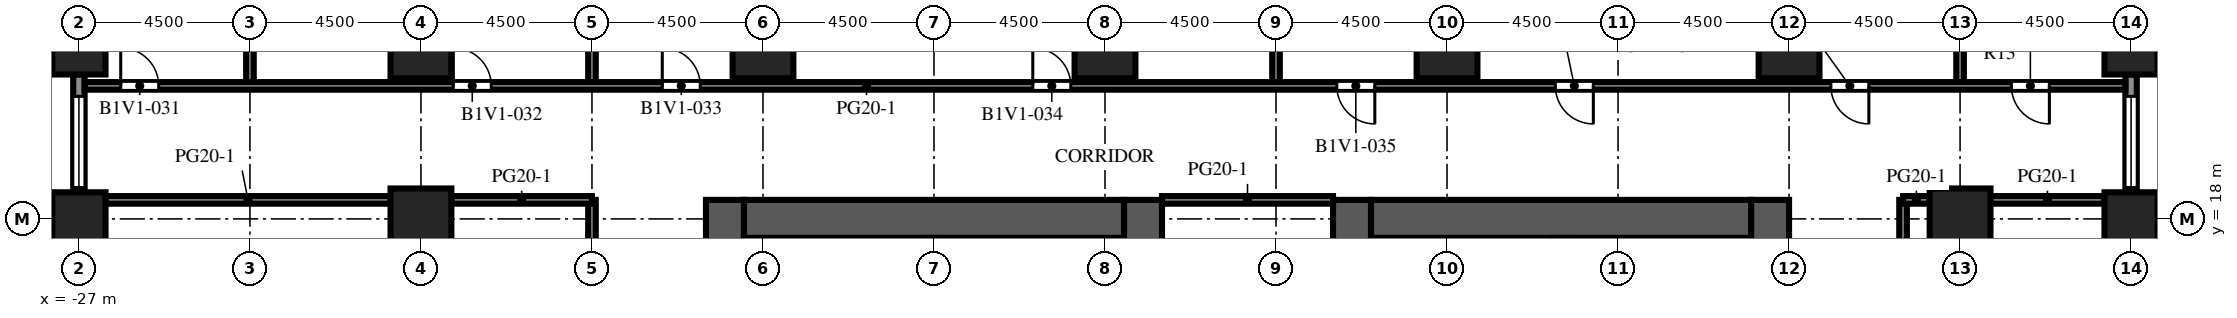
"""IFC4 building model, lengths in metres.
Left out: names, types, materials, properties, quantities, classifications, styles, units other than length and angle.
Written with IfcOpenShell. Run it as: python <this file> out.ifc"""

import sys

from ifc_helpers import new_model, si_unit, direction, frame, frame_2d, origin, origin_2d, place, context, subcontext, project, spatial, rectangle, extrude, element, fill, save


model = new_model("IFC4")
c1 = context("Model", 3, precision=1e-05, world=origin(), true_north=direction((0.0, 1.0)))
c2 = subcontext(c1, "Body", "Model", "MODEL_VIEW")
j1 = project(units=[si_unit("LENGTHUNIT", "METRE"), si_unit("PLANEANGLEUNIT", "RADIAN")], contexts=[c1])
p1 = place(None, origin())
s1 = spatial("IfcSite", under=j1, at=p1, CompositionType="ELEMENT")
p2 = place(p1, origin())
s2 = spatial("IfcBuilding", under=s1, at=p2, CompositionType="ELEMENT")
p3 = place(p2, frame((0.0, 0.0, 27.7)))
s3 = spatial("IfcBuildingStorey", under=s2, at=p3, CompositionType="ELEMENT", Elevation=27.7)
for number, where, z_axis, x_axis in (
    (1, (-27.0, 18.0, 0.0), (0.0, 0.0, 1.0), (1.0, 0.0, 0.0)),
    (2, (-27.0, 22.5, 0.0), (0.0, 0.0, 1.0), (1.0, 0.0, 0.0)),
    (3, (27.0, 18.0, 0.0), (0.0, 0.0, 1.0), (1.0, 0.0, 0.0)),
    (4, (27.0, 22.5, 0.0), (0.0, 0.0, 1.0), (1.0, 0.0, 0.0)),
):
    element("IfcColumn", number, at=place(p3, frame(where, z_axis=z_axis, x_axis=x_axis)), inside=s3, PredefinedType="COLUMN", context=c2, shape_type="SweptSolid", body=[
        extrude(rectangle(XDim=1.4, YDim=1.4, at=origin_2d()), origin(), (0.0, 0.0, 1.0), 4.1),
    ])
for number, where, z_axis, x_axis in (
    (5, (-18.0, 18.0, 0.0), (0.0, 0.0, 1.0), (1.0, 0.0, 0.0)),
    (6, (-18.0, 22.5, 0.0), (0.0, 0.0, 1.0), (1.0, 0.0, 0.0)),
    (7, (-9.0, 22.5, 0.0), (0.0, 0.0, 1.0), (1.0, 0.0, 0.0)),
    (8, (0.0, 22.5, 0.0), (0.0, 0.0, 1.0), (1.0, 0.0, 0.0)),
    (9, (9.0, 22.5, 0.0), (0.0, 0.0, 1.0), (1.0, 0.0, 0.0)),
    (10, (18.0, 22.5, 0.0), (0.0, 0.0, 1.0), (1.0, 0.0, 0.0)),
    (11, (22.5, 18.0, 0.0), (0.0, 0.0, 1.0), (1.0, 0.0, 0.0)),
):
    element("IfcColumn", number, at=place(p3, frame(where, z_axis=z_axis, x_axis=x_axis)), inside=s3, PredefinedType="COLUMN", context=c2, shape_type="SweptSolid", body=[
        extrude(rectangle(XDim=1.6, YDim=1.6, at=origin_2d()), origin(), (0.0, 0.0, 1.0), 4.1),
    ])
p4 = place(p3, frame((-10.0, -9.0, 0.0), z_axis=(0.0, 0.0, 1.0), x_axis=(0.0, 1.0, 0.0)))
e12 = element("IfcWall", 12, at=p4, inside=s3, PredefinedType="SHEAR", context=c2, shape_type="SweptSolid", body=[
    extrude(rectangle(XDim=27.5, YDim=1.0, at=frame_2d((13.75, 0.0))), origin(), (0.0, 0.0, 1.0), 4.1),
])
p5 = place(p4, frame((12.55, 0.0, 0.0)))
e13 = element("IfcOpeningElement", 13, at=p5, cuts=e12, PredefinedType="OPENING", context=c2, shape_type="SweptSolid", body=[
    extrude(rectangle(XDim=2.4, YDim=2.4, at=frame_2d((1.2, 1.2))), frame((0.0, 0.51, 0.0), z_axis=(0.0, -1.0, 0.0), x_axis=(1.0, 0.0, 0.0)), (0.0, 0.0, 1.0), 1.02),
])
p6 = place(p4, frame((6.825, 0.0, 0.0)))
e14 = element("IfcOpeningElement", 14, at=p6, cuts=e12, PredefinedType="OPENING", context=c2, shape_type="SweptSolid", body=[
    extrude(rectangle(XDim=1.2, YDim=2.1, at=frame_2d((0.6, 1.05))), frame((0.0, 0.51, 0.0), z_axis=(0.0, -1.0, 0.0), x_axis=(1.0, 0.0, 0.0)), (0.0, 0.0, 1.0), 1.02),
])
p7 = place(p4, frame((19.475, 0.0, 0.0)))
e15 = element("IfcOpeningElement", 15, at=p7, cuts=e12, PredefinedType="OPENING", context=c2, shape_type="SweptSolid", body=[
    extrude(rectangle(XDim=1.2, YDim=2.1, at=frame_2d((0.6, 1.05))), frame((0.0, 0.51, 0.0), z_axis=(0.0, -1.0, 0.0), x_axis=(1.0, 0.0, 0.0)), (0.0, 0.0, 1.0), 1.02),
])
p8 = place(p3, frame((1.0, -9.0, 0.0), z_axis=(0.0, 0.0, 1.0), x_axis=(0.0, 1.0, 0.0)))
e16 = element("IfcWall", 16, at=p8, inside=s3, PredefinedType="SHEAR", context=c2, shape_type="SweptSolid", body=[
    extrude(rectangle(XDim=27.5, YDim=1.0, at=frame_2d((13.75, 0.0))), origin(), (0.0, 0.0, 1.0), 4.1),
])
p9 = place(p8, frame((12.55, 0.0, 0.0)))
e17 = element("IfcOpeningElement", 17, at=p9, cuts=e16, PredefinedType="OPENING", context=c2, shape_type="SweptSolid", body=[
    extrude(rectangle(XDim=2.4, YDim=2.4, at=frame_2d((1.2, 1.2))), frame((0.0, 0.51, 0.0), z_axis=(0.0, -1.0, 0.0), x_axis=(1.0, 0.0, 0.0)), (0.0, 0.0, 1.0), 1.02),
])
p10 = place(p8, frame((3.955, 0.0, 0.0)))
e18 = element("IfcOpeningElement", 18, at=p10, cuts=e16, PredefinedType="OPENING", context=c2, shape_type="SweptSolid", body=[
    extrude(rectangle(XDim=0.905, YDim=2.1, at=frame_2d((0.453, 1.05))), frame((0.0, 0.51, 0.0), z_axis=(0.0, -1.0, 0.0), x_axis=(1.0, 0.0, 0.0)), (0.0, 0.0, 1.0), 1.02),
])
p11 = place(p8, frame((23.363, 0.0, 0.0)))
e19 = element("IfcOpeningElement", 19, at=p11, cuts=e16, PredefinedType="OPENING", context=c2, shape_type="SweptSolid", body=[
    extrude(rectangle(XDim=1.2, YDim=2.1, at=frame_2d((0.6, 1.05))), frame((0.0, 0.51, 0.0), z_axis=(0.0, -1.0, 0.0), x_axis=(1.0, 0.0, 0.0)), (0.0, 0.0, 1.0), 1.02),
])
p12 = place(p3, frame((-9.5, 18.0, 0.0), z_axis=(0.0, 0.0, 1.0), x_axis=(1.0, 0.0, 0.0)))
e20 = element("IfcWall", 20, at=p12, inside=s3, PredefinedType="SHEAR", context=c2, shape_type="SweptSolid", body=[
    extrude(rectangle(XDim=10.0, YDim=1.0, at=frame_2d((5.0, 0.0))), origin(), (0.0, 0.0, 1.0), 4.1),
])
p13 = place(p3, frame((6.5, -9.0, 0.0), z_axis=(0.0, 0.0, 1.0), x_axis=(0.0, 1.0, 0.0)))
e21 = element("IfcWall", 21, at=p13, inside=s3, PredefinedType="SHEAR", context=c2, shape_type="SweptSolid", body=[
    extrude(rectangle(XDim=27.5, YDim=1.0, at=frame_2d((13.75, 0.0))), origin(), (0.0, 0.0, 1.0), 4.1),
])
p14 = place(p13, frame((12.55, 0.0, 0.0)))
e22 = element("IfcOpeningElement", 22, at=p14, cuts=e21, PredefinedType="OPENING", context=c2, shape_type="SweptSolid", body=[
    extrude(rectangle(XDim=2.4, YDim=2.4, at=frame_2d((1.2, 1.2))), frame((0.0, 0.51, 0.0), z_axis=(0.0, -1.0, 0.0), x_axis=(1.0, 0.0, 0.0)), (0.0, 0.0, 1.0), 1.02),
])
p15 = place(p13, frame((3.955, 0.0, 0.0)))
e23 = element("IfcOpeningElement", 23, at=p15, cuts=e21, PredefinedType="OPENING", context=c2, shape_type="SweptSolid", body=[
    extrude(rectangle(XDim=0.905, YDim=2.1, at=frame_2d((0.453, 1.05))), frame((0.0, 0.51, 0.0), z_axis=(0.0, -1.0, 0.0), x_axis=(1.0, 0.0, 0.0)), (0.0, 0.0, 1.0), 1.02),
])
p16 = place(p13, frame((23.363, 0.0, 0.0)))
e24 = element("IfcOpeningElement", 24, at=p16, cuts=e21, PredefinedType="OPENING", context=c2, shape_type="SweptSolid", body=[
    extrude(rectangle(XDim=1.2, YDim=2.1, at=frame_2d((0.6, 1.05))), frame((0.0, 0.51, 0.0), z_axis=(0.0, -1.0, 0.0), x_axis=(1.0, 0.0, 0.0)), (0.0, 0.0, 1.0), 1.02),
])
p17 = place(p3, frame((17.5, -9.0, 0.0), z_axis=(0.0, 0.0, 1.0), x_axis=(0.0, 1.0, 0.0)))
e25 = element("IfcWall", 25, at=p17, inside=s3, PredefinedType="SHEAR", context=c2, shape_type="SweptSolid", body=[
    extrude(rectangle(XDim=27.5, YDim=1.0, at=frame_2d((13.75, 0.0))), origin(), (0.0, 0.0, 1.0), 4.1),
])
p18 = place(p17, frame((12.55, 0.0, 0.0)))
e26 = element("IfcOpeningElement", 26, at=p18, cuts=e25, PredefinedType="OPENING", context=c2, shape_type="SweptSolid", body=[
    extrude(rectangle(XDim=2.4, YDim=2.4, at=frame_2d((1.2, 1.2))), frame((0.0, 0.51, 0.0), z_axis=(0.0, -1.0, 0.0), x_axis=(1.0, 0.0, 0.0)), (0.0, 0.0, 1.0), 1.02),
])
p19 = place(p17, frame((6.825, 0.0, 0.0)))
e27 = element("IfcOpeningElement", 27, at=p19, cuts=e25, PredefinedType="OPENING", context=c2, shape_type="SweptSolid", body=[
    extrude(rectangle(XDim=1.2, YDim=2.1, at=frame_2d((0.6, 1.05))), frame((0.0, 0.51, 0.0), z_axis=(0.0, -1.0, 0.0), x_axis=(1.0, 0.0, 0.0)), (0.0, 0.0, 1.0), 1.02),
])
p20 = place(p17, frame((19.475, 0.0, 0.0)))
e28 = element("IfcOpeningElement", 28, at=p20, cuts=e25, PredefinedType="OPENING", context=c2, shape_type="SweptSolid", body=[
    extrude(rectangle(XDim=1.2, YDim=2.1, at=frame_2d((0.6, 1.05))), frame((0.0, 0.51, 0.0), z_axis=(0.0, -1.0, 0.0), x_axis=(1.0, 0.0, 0.0)), (0.0, 0.0, 1.0), 1.02),
])
p21 = place(p3, frame((7.0, 18.0, 0.0), z_axis=(0.0, 0.0, 1.0), x_axis=(1.0, 0.0, 0.0)))
e29 = element("IfcWall", 29, at=p21, inside=s3, PredefinedType="SHEAR", context=c2, shape_type="SweptSolid", body=[
    extrude(rectangle(XDim=10.0, YDim=1.0, at=frame_2d((5.0, 0.0))), origin(), (0.0, 0.0, 1.0), 4.1),
])
p22 = place(p3, frame((27.0, 21.8, 0.0), z_axis=(0.0, 0.0, 1.0), x_axis=(0.0, -1.0, 0.0)))
e30 = element("IfcWall", 30, at=p22, inside=s3, PredefinedType="SOLIDWALL", context=c2, shape_type="SweptSolid", body=[
    extrude(rectangle(XDim=3.1, YDim=0.3, at=frame_2d((1.55, 0.0))), origin(), (0.0, 0.0, 1.0), 2.75),
])
p23 = place(p22, frame((0.575, 0.0, 0.8)))
e31 = element("IfcOpeningElement", 31, at=p23, cuts=e30, PredefinedType="OPENING", context=c2, shape_type="SweptSolid", body=[
    extrude(rectangle(XDim=2.4, YDim=1.7, at=frame_2d((1.2, 0.85))), frame((0.0, 0.16, 0.0), z_axis=(0.0, -1.0, 0.0), x_axis=(1.0, 0.0, 0.0)), (0.0, 0.0, 1.0), 0.32),
])
p24 = place(p3, frame((-27.0, 18.7, 0.0), z_axis=(0.0, 0.0, 1.0), x_axis=(0.0, 1.0, 0.0)))
e32 = element("IfcWall", 32, at=p24, inside=s3, PredefinedType="SOLIDWALL", context=c2, shape_type="SweptSolid", body=[
    extrude(rectangle(XDim=3.1, YDim=0.3, at=frame_2d((1.55, 0.0))), origin(), (0.0, 0.0, 1.0), 2.75),
])
p25 = place(p24, frame((0.125, 0.0, 0.8)))
e33 = element("IfcOpeningElement", 33, at=p25, cuts=e32, PredefinedType="OPENING", context=c2, shape_type="SweptSolid", body=[
    extrude(rectangle(XDim=2.4, YDim=1.7, at=frame_2d((1.2, 0.85))), frame((0.0, 0.16, 0.0), z_axis=(0.0, -1.0, 0.0), x_axis=(1.0, 0.0, 0.0)), (0.0, 0.0, 1.0), 0.32),
])
p26 = place(p3, frame((-22.5, 21.5, 0.0), z_axis=(0.0, 0.0, 1.0), x_axis=(0.0, 1.0, 0.0)))
e34 = element("IfcWall", 34, at=p26, inside=s3, PredefinedType="PARTITIONING", context=c2, shape_type="SweptSolid", body=[
    extrude(rectangle(XDim=4.8, YDim=0.2, at=frame_2d((2.4, 0.0))), origin(), (0.0, 0.0, 1.0), 3.65),
])
p27 = place(p3, frame((-13.5, -9.0, 0.0), z_axis=(0.0, 0.0, 1.0), x_axis=(0.0, 1.0, 0.0)))
e35 = element("IfcWall", 35, at=p27, inside=s3, PredefinedType="PARTITIONING", context=c2, shape_type="SweptSolid", body=[
    extrude(rectangle(XDim=27.5, YDim=0.2, at=frame_2d((13.75, 0.0))), origin(), (0.0, 0.0, 1.0), 3.65),
])
p28 = place(p27, frame((8.6, 0.0, 0.0)))
e36 = element("IfcOpeningElement", 36, at=p28, cuts=e35, PredefinedType="OPENING", context=c2, shape_type="SweptSolid", body=[
    extrude(rectangle(XDim=1.0, YDim=2.1, at=frame_2d((0.5, 1.05))), frame((0.0, 0.11, 0.0), z_axis=(0.0, -1.0, 0.0), x_axis=(1.0, 0.0, 0.0)), (0.0, 0.0, 1.0), 0.22),
])
p29 = place(p27, frame((15.1, 0.0, 0.0)))
e37 = element("IfcOpeningElement", 37, at=p29, cuts=e35, PredefinedType="OPENING", context=c2, shape_type="SweptSolid", body=[
    extrude(rectangle(XDim=1.0, YDim=2.1, at=frame_2d((0.5, 1.05))), frame((0.0, 0.11, 0.0), z_axis=(0.0, -1.0, 0.0), x_axis=(1.0, 0.0, 0.0)), (0.0, 0.0, 1.0), 0.22),
])
p30 = place(p27, frame((21.6, 0.0, 0.0)))
e38 = element("IfcOpeningElement", 38, at=p30, cuts=e35, PredefinedType="OPENING", context=c2, shape_type="SweptSolid", body=[
    extrude(rectangle(XDim=1.0, YDim=2.1, at=frame_2d((0.5, 1.05))), frame((0.0, 0.11, 0.0), z_axis=(0.0, -1.0, 0.0), x_axis=(1.0, 0.0, 0.0)), (0.0, 0.0, 1.0), 0.22),
])
for number, where, z_axis, x_axis in (
    (39, (-13.5, 21.5, 0.0), (0.0, 0.0, 1.0), (0.0, 1.0, 0.0)),
    (40, (4.5, 21.5, 0.0), (0.0, 0.0, 1.0), (0.0, 1.0, 0.0)),
):
    element("IfcWall", number, at=place(p3, frame(where, z_axis=z_axis, x_axis=x_axis)), inside=s3, PredefinedType="PARTITIONING", context=c2, shape_type="SweptSolid", body=[
        extrude(rectangle(XDim=4.8, YDim=0.2, at=frame_2d((2.4, 0.0))), origin(), (0.0, 0.0, 1.0), 3.65),
    ])
p31 = place(p3, frame((21.0, 18.5, 0.0), z_axis=(0.0, 0.0, 1.0), x_axis=(0.0, -1.0, 0.0)))
e41 = element("IfcWall", 41, at=p31, inside=s3, PredefinedType="PARTITIONING", context=c2, shape_type="SweptSolid", body=[
    extrude(rectangle(XDim=27.5, YDim=0.2, at=frame_2d((13.75, 0.0))), origin(), (0.0, 0.0, 1.0), 3.65),
])
p32 = place(p31, frame((19.4, 0.0, 0.0)))
e42 = element("IfcOpeningElement", 42, at=p32, cuts=e41, PredefinedType="OPENING", context=c2, shape_type="SweptSolid", body=[
    extrude(rectangle(XDim=1.0, YDim=2.1, at=frame_2d((0.5, 1.05))), frame((0.0, 0.11, 0.0), z_axis=(0.0, -1.0, 0.0), x_axis=(1.0, 0.0, 0.0)), (0.0, 0.0, 1.0), 0.22),
])
p33 = place(p31, frame((11.15, 0.0, 0.0)))
e43 = element("IfcOpeningElement", 43, at=p33, cuts=e41, PredefinedType="OPENING", context=c2, shape_type="SweptSolid", body=[
    extrude(rectangle(XDim=1.0, YDim=2.1, at=frame_2d((0.5, 1.05))), frame((0.0, 0.11, 0.0), z_axis=(0.0, -1.0, 0.0), x_axis=(1.0, 0.0, 0.0)), (0.0, 0.0, 1.0), 0.22),
])
p34 = place(p31, frame((4.65, 0.0, 0.0)))
e44 = element("IfcOpeningElement", 44, at=p34, cuts=e41, PredefinedType="OPENING", context=c2, shape_type="SweptSolid", body=[
    extrude(rectangle(XDim=1.0, YDim=2.1, at=frame_2d((0.5, 1.05))), frame((0.0, 0.11, 0.0), z_axis=(0.0, -1.0, 0.0), x_axis=(1.0, 0.0, 0.0)), (0.0, 0.0, 1.0), 0.22),
])
p35 = place(p3, frame((22.5, 21.5, 0.0), z_axis=(0.0, 0.0, 1.0), x_axis=(0.0, 1.0, 0.0)))
e45 = element("IfcWall", 45, at=p35, inside=s3, PredefinedType="PARTITIONING", context=c2, shape_type="SweptSolid", body=[
    extrude(rectangle(XDim=4.8, YDim=0.2, at=frame_2d((2.4, 0.0))), origin(), (0.0, 0.0, 1.0), 3.65),
])
p36 = place(p3, frame((-26.3, 18.5, 0.0), z_axis=(0.0, 0.0, 1.0), x_axis=(1.0, 0.0, 0.0)))
e46 = element("IfcWall", 46, at=p36, inside=s3, PredefinedType="PARTITIONING", context=c2, shape_type="SweptSolid", body=[
    extrude(rectangle(XDim=7.5, YDim=0.2, at=frame_2d((3.75, 0.0))), origin(), (0.0, 0.0, 1.0), 3.65),
])
p37 = place(p3, frame((-17.2, 18.5, 0.0), z_axis=(0.0, 0.0, 1.0), x_axis=(1.0, 0.0, 0.0)))
e47 = element("IfcWall", 47, at=p37, inside=s3, PredefinedType="PARTITIONING", context=c2, shape_type="SweptSolid", body=[
    extrude(rectangle(XDim=3.7, YDim=0.2, at=frame_2d((1.85, 0.0))), origin(), (0.0, 0.0, 1.0), 3.65),
])
p38 = place(p3, frame((1.5, 18.5, 0.0), z_axis=(0.0, 0.0, 1.0), x_axis=(1.0, 0.0, 0.0)))
e48 = element("IfcWall", 48, at=p38, inside=s3, PredefinedType="PARTITIONING", context=c2, shape_type="SweptSolid", body=[
    extrude(rectangle(XDim=4.5, YDim=0.2, at=frame_2d((2.25, 0.0))), origin(), (0.0, 0.0, 1.0), 3.65),
])
p39 = place(p3, frame((21.0, 18.5, 0.0), z_axis=(0.0, 0.0, 1.0), x_axis=(1.0, 0.0, 0.0)))
e49 = element("IfcWall", 49, at=p39, inside=s3, PredefinedType="PARTITIONING", context=c2, shape_type="SweptSolid", body=[
    extrude(rectangle(XDim=0.7, YDim=0.2, at=frame_2d((0.35, 0.0))), origin(), (0.0, 0.0, 1.0), 3.65),
])
p40 = place(p3, frame((23.3, 18.5, 0.0), z_axis=(0.0, 0.0, 1.0), x_axis=(1.0, 0.0, 0.0)))
e50 = element("IfcWall", 50, at=p40, inside=s3, PredefinedType="PARTITIONING", context=c2, shape_type="SweptSolid", body=[
    extrude(rectangle(XDim=3.0, YDim=0.2, at=frame_2d((1.5, 0.0))), origin(), (0.0, 0.0, 1.0), 3.65),
])
p41 = place(p3, frame((-26.85, 21.5, 0.0), z_axis=(0.0, 0.0, 1.0), x_axis=(1.0, 0.0, 0.0)))
e51 = element("IfcWall", 51, at=p41, inside=s3, PredefinedType="PARTITIONING", context=c2, shape_type="SweptSolid", body=[
    extrude(rectangle(XDim=53.7, YDim=0.2, at=frame_2d((26.85, 0.0))), origin(), (0.0, 0.0, 1.0), 3.65),
])
p42 = place(p41, frame((0.95, 0.0, 0.0)))
e52 = element("IfcOpeningElement", 52, at=p42, cuts=e51, PredefinedType="OPENING", context=c2, shape_type="SweptSolid", body=[
    extrude(rectangle(XDim=1.0, YDim=2.1, at=frame_2d((0.5, 1.05))), frame((0.0, 0.11, 0.0), z_axis=(0.0, -1.0, 0.0), x_axis=(1.0, 0.0, 0.0)), (0.0, 0.0, 1.0), 0.22),
])
p43 = place(p41, frame((9.7, 0.0, 0.0)))
e53 = element("IfcOpeningElement", 53, at=p43, cuts=e51, PredefinedType="OPENING", context=c2, shape_type="SweptSolid", body=[
    extrude(rectangle(XDim=1.0, YDim=2.1, at=frame_2d((0.5, 1.05))), frame((0.0, 0.11, 0.0), z_axis=(0.0, -1.0, 0.0), x_axis=(1.0, 0.0, 0.0)), (0.0, 0.0, 1.0), 0.22),
])
p44 = place(p41, frame((15.2, 0.0, 0.0)))
e54 = element("IfcOpeningElement", 54, at=p44, cuts=e51, PredefinedType="OPENING", context=c2, shape_type="SweptSolid", body=[
    extrude(rectangle(XDim=1.0, YDim=2.1, at=frame_2d((0.5, 1.05))), frame((0.0, 0.11, 0.0), z_axis=(0.0, -1.0, 0.0), x_axis=(1.0, 0.0, 0.0)), (0.0, 0.0, 1.0), 0.22),
])
p45 = place(p41, frame((24.95, 0.0, 0.0)))
e55 = element("IfcOpeningElement", 55, at=p45, cuts=e51, PredefinedType="OPENING", context=c2, shape_type="SweptSolid", body=[
    extrude(rectangle(XDim=1.0, YDim=2.1, at=frame_2d((0.5, 1.05))), frame((0.0, 0.11, 0.0), z_axis=(0.0, -1.0, 0.0), x_axis=(1.0, 0.0, 0.0)), (0.0, 0.0, 1.0), 0.22),
])
p46 = place(p41, frame((32.95, 0.0, 0.0)))
e56 = element("IfcOpeningElement", 56, at=p46, cuts=e51, PredefinedType="OPENING", context=c2, shape_type="SweptSolid", body=[
    extrude(rectangle(XDim=1.0, YDim=2.1, at=frame_2d((0.5, 1.05))), frame((0.0, 0.11, 0.0), z_axis=(0.0, -1.0, 0.0), x_axis=(1.0, 0.0, 0.0)), (0.0, 0.0, 1.0), 0.22),
])
p47 = place(p41, frame((38.7, 0.0, 0.0)))
e57 = element("IfcOpeningElement", 57, at=p47, cuts=e51, PredefinedType="OPENING", context=c2, shape_type="SweptSolid", body=[
    extrude(rectangle(XDim=1.0, YDim=2.1, at=frame_2d((0.5, 1.05))), frame((0.0, 0.11, 0.0), z_axis=(0.0, -1.0, 0.0), x_axis=(1.0, 0.0, 0.0)), (0.0, 0.0, 1.0), 0.22),
])
p48 = place(p41, frame((45.95, 0.0, 0.0)))
e58 = element("IfcOpeningElement", 58, at=p48, cuts=e51, PredefinedType="OPENING", context=c2, shape_type="SweptSolid", body=[
    extrude(rectangle(XDim=1.0, YDim=2.1, at=frame_2d((0.5, 1.05))), frame((0.0, 0.11, 0.0), z_axis=(0.0, -1.0, 0.0), x_axis=(1.0, 0.0, 0.0)), (0.0, 0.0, 1.0), 0.22),
])
p49 = place(p41, frame((50.7, 0.0, 0.0)))
e59 = element("IfcOpeningElement", 59, at=p49, cuts=e51, PredefinedType="OPENING", context=c2, shape_type="SweptSolid", body=[
    extrude(rectangle(XDim=1.0, YDim=2.1, at=frame_2d((0.5, 1.05))), frame((0.0, 0.11, 0.0), z_axis=(0.0, -1.0, 0.0), x_axis=(1.0, 0.0, 0.0)), (0.0, 0.0, 1.0), 0.22),
])
p50 = place(p23, origin())
e60 = element("IfcWindow", 60, at=p50, inside=s3, PartitioningType="SINGLE_PANEL", PredefinedType="WINDOW", context=c2, shape_type="SweptSolid", body=[
    extrude(rectangle(XDim=2.4, YDim=1.7, at=frame_2d((1.2, 0.85))), frame((0.0, 0.03, 0.0), z_axis=(0.0, -1.0, 0.0), x_axis=(1.0, 0.0, 0.0)), (0.0, 0.0, 1.0), 0.06),
])
fill(e31, e60)
p51 = place(p25, origin())
e61 = element("IfcWindow", 61, at=p51, inside=s3, PartitioningType="SINGLE_PANEL", PredefinedType="WINDOW", context=c2, shape_type="SweptSolid", body=[
    extrude(rectangle(XDim=2.4, YDim=1.7, at=frame_2d((1.2, 0.85))), frame((0.0, 0.03, 0.0), z_axis=(0.0, -1.0, 0.0), x_axis=(1.0, 0.0, 0.0)), (0.0, 0.0, 1.0), 0.06),
])
fill(e33, e61)
p52 = place(p42, origin())
e62 = element("IfcDoor", 62, at=p52, inside=s3, OperationType="SINGLE_SWING_LEFT", PredefinedType="DOOR", context=c2, shape_type="SweptSolid", body=[
    extrude(rectangle(XDim=1.0, YDim=2.1, at=frame_2d((0.5, 1.05))), frame((0.0, 0.025, 0.0), z_axis=(0.0, -1.0, 0.0), x_axis=(1.0, 0.0, 0.0)), (0.0, 0.0, 1.0), 0.05),
])
fill(e52, e62)
p53 = place(p43, origin())
e63 = element("IfcDoor", 63, at=p53, inside=s3, OperationType="SINGLE_SWING_LEFT", PredefinedType="DOOR", context=c2, shape_type="SweptSolid", body=[
    extrude(rectangle(XDim=1.0, YDim=2.1, at=frame_2d((0.5, 1.05))), frame((0.0, 0.025, 0.0), z_axis=(0.0, -1.0, 0.0), x_axis=(1.0, 0.0, 0.0)), (0.0, 0.0, 1.0), 0.05),
])
fill(e53, e63)
p54 = place(p44, origin())
e64 = element("IfcDoor", 64, at=p54, inside=s3, OperationType="SINGLE_SWING_LEFT", PredefinedType="DOOR", context=c2, shape_type="SweptSolid", body=[
    extrude(rectangle(XDim=1.0, YDim=2.1, at=frame_2d((0.5, 1.05))), frame((0.0, 0.025, 0.0), z_axis=(0.0, -1.0, 0.0), x_axis=(1.0, 0.0, 0.0)), (0.0, 0.0, 1.0), 0.05),
])
fill(e54, e64)
p55 = place(p45, origin())
e65 = element("IfcDoor", 65, at=p55, inside=s3, OperationType="SINGLE_SWING_LEFT", PredefinedType="DOOR", context=c2, shape_type="SweptSolid", body=[
    extrude(rectangle(XDim=1.0, YDim=2.1, at=frame_2d((0.5, 1.05))), frame((0.0, 0.025, 0.0), z_axis=(0.0, -1.0, 0.0), x_axis=(1.0, 0.0, 0.0)), (0.0, 0.0, 1.0), 0.05),
])
fill(e55, e65)
p56 = place(p46, origin())
e66 = element("IfcDoor", 66, at=p56, inside=s3, OperationType="SINGLE_SWING_RIGHT", PredefinedType="DOOR", context=c2, shape_type="SweptSolid", body=[
    extrude(rectangle(XDim=1.0, YDim=2.1, at=frame_2d((0.5, 1.05))), frame((0.0, 0.025, 0.0), z_axis=(0.0, -1.0, 0.0), x_axis=(1.0, 0.0, 0.0)), (0.0, 0.0, 1.0), 0.05),
])
fill(e56, e66)
p57 = place(p47, origin())
e67 = element("IfcDoor", 67, at=p57, inside=s3, OperationType="SINGLE_SWING_RIGHT", PredefinedType="DOOR", context=c2, shape_type="SweptSolid", body=[
    extrude(rectangle(XDim=1.0, YDim=2.1, at=frame_2d((0.5, 1.05))), frame((0.0, 0.025, 0.0), z_axis=(0.0, -1.0, 0.0), x_axis=(1.0, 0.0, 0.0)), (0.0, 0.0, 1.0), 0.05),
])
fill(e57, e67)
p58 = place(p48, origin())
e68 = element("IfcDoor", 68, at=p58, inside=s3, OperationType="SINGLE_SWING_RIGHT", PredefinedType="DOOR", context=c2, shape_type="SweptSolid", body=[
    extrude(rectangle(XDim=1.0, YDim=2.1, at=frame_2d((0.5, 1.05))), frame((0.0, 0.025, 0.0), z_axis=(0.0, -1.0, 0.0), x_axis=(1.0, 0.0, 0.0)), (0.0, 0.0, 1.0), 0.05),
])
fill(e58, e68)
p59 = place(p49, origin())
e69 = element("IfcDoor", 69, at=p59, inside=s3, OperationType="SINGLE_SWING_RIGHT", PredefinedType="DOOR", context=c2, shape_type="SweptSolid", body=[
    extrude(rectangle(XDim=1.0, YDim=2.1, at=frame_2d((0.5, 1.05))), frame((0.0, 0.025, 0.0), z_axis=(0.0, -1.0, 0.0), x_axis=(1.0, 0.0, 0.0)), (0.0, 0.0, 1.0), 0.05),
])
fill(e59, e69)
save(model, sys.argv[1])
